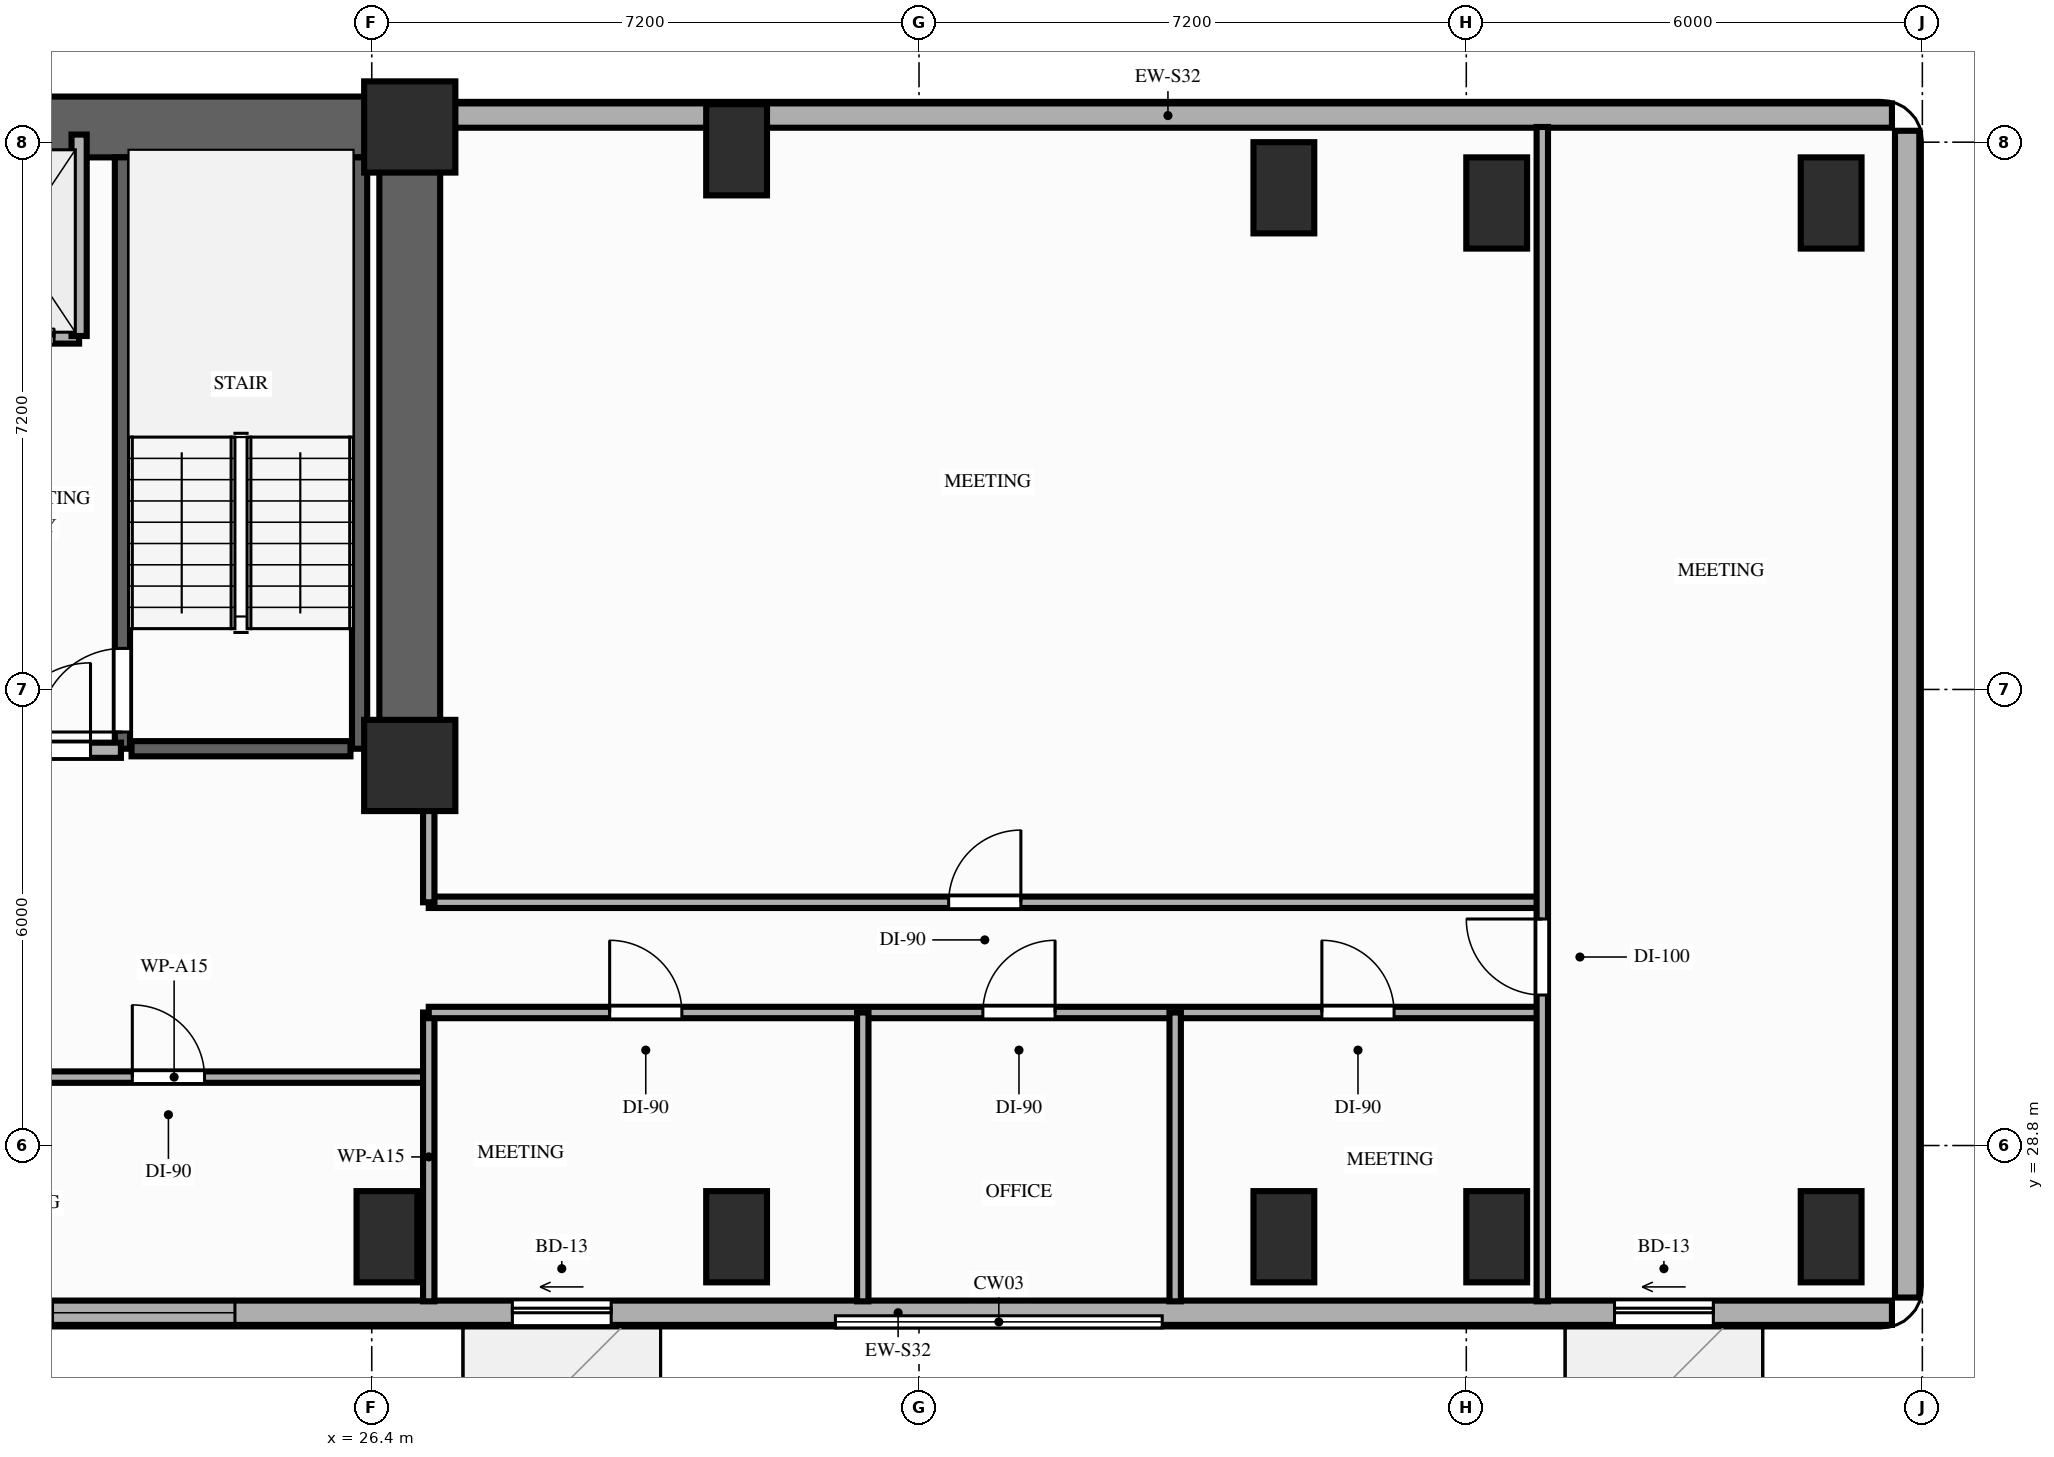
"""IFC4 building model, lengths in metres.
Left out: names, types, materials, properties, quantities, classifications, styles, units other than length and angle.
Written with IfcOpenShell. Run it as: python <this file> out.ifc"""

import sys

from ifc_helpers import new_model, si_unit, direction, frame, frame_2d, origin, origin_2d, place, context, subcontext, project, spatial, rectangle, extrude, element, fill, save


model = new_model("IFC4")
c1 = context("Model", 3, precision=1e-05, world=origin(), true_north=direction((0.0, 1.0)))
c2 = subcontext(c1, "Body", "Model", "MODEL_VIEW")
j1 = project(units=[si_unit("LENGTHUNIT", "METRE"), si_unit("PLANEANGLEUNIT", "RADIAN")], contexts=[c1])
p1 = place(None, origin())
s1 = spatial("IfcSite", under=j1, at=p1, CompositionType="ELEMENT")
p2 = place(p1, origin())
s2 = spatial("IfcBuilding", under=s1, at=p2, CompositionType="ELEMENT")
p3 = place(p2, frame((0.0, 0.0, 69.2)))
s3 = spatial("IfcBuildingStorey", under=s2, at=p3, CompositionType="ELEMENT", Elevation=69.2)
for number, where, z_axis, x_axis in (
    (1, (26.9, 33.8, 0.0), (0.0, 0.0, 1.0), (1.0, 0.0, 0.0)),
    (2, (26.9, 42.2, 0.0), (0.0, 0.0, 1.0), (1.0, 0.0, 0.0)),
):
    element("IfcColumn", number, at=place(p3, frame(where, z_axis=z_axis, x_axis=x_axis)), inside=s3, PredefinedType="COLUMN", context=c2, shape_type="SweptSolid", body=[
        extrude(rectangle(XDim=1.2, YDim=1.2, at=origin_2d()), origin(), (0.0, 0.0, 1.0), 3.2),
    ])
for number, where, z_axis, x_axis in (
    (3, (26.6, 27.6, 0.0), (0.0, 0.0, 1.0), (1.0, 0.0, 0.0)),
    (4, (31.2, 27.6, 0.0), (0.0, 0.0, 1.0), (1.0, 0.0, 0.0)),
    (5, (31.2, 41.9, 0.0), (0.0, 0.0, 1.0), (1.0, 0.0, 0.0)),
    (6, (38.4, 27.6, 0.0), (0.0, 0.0, 1.0), (1.0, 0.0, 0.0)),
    (7, (38.4, 41.4, 0.0), (0.0, 0.0, 1.0), (1.0, 0.0, 0.0)),
    (8, (41.2, 27.6, 0.0), (0.0, 0.0, 1.0), (1.0, 0.0, 0.0)),
    (9, (41.2, 41.2, 0.0), (0.0, 0.0, 1.0), (1.0, 0.0, 0.0)),
    (10, (45.6, 27.6, 0.0), (0.0, 0.0, 1.0), (1.0, 0.0, 0.0)),
    (11, (45.6, 41.2, 0.0), (0.0, 0.0, 1.0), (1.0, 0.0, 0.0)),
):
    element("IfcColumn", number, at=place(p3, frame(where, z_axis=z_axis, x_axis=x_axis)), inside=s3, PredefinedType="COLUMN", context=c2, shape_type="SweptSolid", body=[
        extrude(rectangle(XDim=0.8, YDim=1.2, at=origin_2d()), origin(), (0.0, 0.0, 1.0), 3.2),
    ])
p4 = place(p3, frame((46.4, 42.35, 0.0), z_axis=(0.0, 0.0, 1.0), x_axis=(-1.0, 0.0, 0.0)))
e12 = element("IfcWall", 12, at=p4, inside=s3, PredefinedType="STANDARD", context=c2, shape_type="SweptSolid", body=[
    extrude(rectangle(XDim=19.05, YDim=0.32, at=frame_2d((9.525, 0.0))), origin(), (0.0, 0.0, 1.0), 2.41),
])
p5 = place(p3, frame((20.25, 26.6, 0.0), z_axis=(0.0, 0.0, 1.0), x_axis=(1.0, 0.0, 0.0)))
e13 = element("IfcWall", 13, at=p5, inside=s3, PredefinedType="STANDARD", context=c2, shape_type="SweptSolid", body=[
    extrude(rectangle(XDim=26.15, YDim=0.32, at=frame_2d((13.075, 0.0))), origin(), (0.0, 0.0, 1.0), 3.02),
])
p6 = place(p5, frame((8.0, 0.0, 0.0)))
e14 = element("IfcOpeningElement", 14, at=p6, cuts=e13, PredefinedType="OPENING", context=c2, shape_type="SweptSolid", body=[
    extrude(rectangle(XDim=1.3, YDim=2.08, at=frame_2d((0.65, 1.04))), frame((0.0, 0.17, 0.0), z_axis=(0.0, -1.0, 0.0), x_axis=(1.0, 0.0, 0.0)), (0.0, 0.0, 1.0), 0.34),
])
p7 = place(p5, frame((22.5, 0.0, 0.0)))
e15 = element("IfcOpeningElement", 15, at=p7, cuts=e13, PredefinedType="OPENING", context=c2, shape_type="SweptSolid", body=[
    extrude(rectangle(XDim=1.3, YDim=2.08, at=frame_2d((0.65, 1.04))), frame((0.0, 0.17, 0.0), z_axis=(0.0, -1.0, 0.0), x_axis=(1.0, 0.0, 0.0)), (0.0, 0.0, 1.0), 0.34),
])
p8 = place(p5, frame((1.95, 0.0, 0.85)))
e16 = element("IfcOpeningElement", 16, at=p8, cuts=e13, PredefinedType="OPENING", context=c2, shape_type="SweptSolid", body=[
    extrude(rectangle(XDim=2.4, YDim=1.8, at=frame_2d((1.2, 0.9))), frame((0.0, 0.17, 0.0), z_axis=(0.0, -1.0, 0.0), x_axis=(1.0, 0.0, 0.0)), (0.0, 0.0, 1.0), 0.34),
])
p9 = place(p3, frame((46.6, 26.8, 0.0), z_axis=(0.0, 0.0, 1.0), x_axis=(0.0, 1.0, 0.0)))
e17 = element("IfcWall", 17, at=p9, inside=s3, PredefinedType="STANDARD", context=c2, shape_type="SweptSolid", body=[
    extrude(rectangle(XDim=15.35, YDim=0.32, at=frame_2d((7.675, 0.0))), origin(), (0.0, 0.0, 1.0), 3.02),
])
p10 = place(p3, frame((6.45, 42.2, 0.0), z_axis=(0.0, 0.0, 1.0), x_axis=(1.0, 0.0, 0.0)))
e18 = element("IfcWall", 18, at=p10, inside=s3, PredefinedType="SHEAR", context=c2, shape_type="SweptSolid", body=[
    extrude(rectangle(XDim=20.45, YDim=0.8, at=frame_2d((10.225, 0.0))), origin(), (0.0, 0.0, 1.0), 3.02),
])
p11 = place(p3, frame((26.9, 33.8, 0.0), z_axis=(0.0, 0.0, 1.0), x_axis=(0.0, 1.0, 0.0)))
e19 = element("IfcWall", 19, at=p11, inside=s3, PredefinedType="SHEAR", context=c2, shape_type="SweptSolid", body=[
    extrude(rectangle(XDim=7.95, YDim=0.8, at=frame_2d((3.975, 0.0))), origin(), (0.0, 0.0, 1.0), 3.02),
])
p12 = place(p3, frame((23.12, 34.02, 0.0), z_axis=(0.0, 0.0, 1.0), x_axis=(0.0, 1.0, 0.0)))
e20 = element("IfcWall", 20, at=p12, inside=s3, PredefinedType="SHEAR", context=c2, shape_type="SweptSolid", body=[
    extrude(rectangle(XDim=7.78, YDim=0.2, at=frame_2d((3.89, 0.0))), origin(), (0.0, 0.0, 1.0), 3.02),
])
p13 = place(p12, frame((0.22, 0.0, 0.0)))
e21 = element("IfcOpeningElement", 21, at=p13, cuts=e20, PredefinedType="OPENING", context=c2, shape_type="SweptSolid", body=[
    extrude(rectangle(XDim=1.1, YDim=2.15, at=frame_2d((0.55, 1.075))), frame((0.0, 0.11, 0.0), z_axis=(0.0, -1.0, 0.0), x_axis=(1.0, 0.0, 0.0)), (0.0, 0.0, 1.0), 0.22),
])
p14 = place(p3, frame((26.24, 34.02, 0.0), z_axis=(0.0, 0.0, 1.0), x_axis=(0.0, 1.0, 0.0)))
e22 = element("IfcWall", 22, at=p14, inside=s3, PredefinedType="SHEAR", context=c2, shape_type="SweptSolid", body=[
    extrude(rectangle(XDim=7.78, YDim=0.2, at=frame_2d((3.89, 0.0))), origin(), (0.0, 0.0, 1.0), 3.02),
])
p15 = place(p3, frame((23.24, 34.02, 0.0), z_axis=(0.0, 0.0, 1.0), x_axis=(1.0, 0.0, 0.0)))
e23 = element("IfcWall", 23, at=p15, inside=s3, PredefinedType="SHEAR", context=c2, shape_type="SweptSolid", body=[
    extrude(rectangle(XDim=2.88, YDim=0.2, at=frame_2d((1.44, 0.0))), origin(), (0.0, 0.0, 1.0), 3.02),
])
p16 = place(p3, frame((20.85, 39.45, 0.0), z_axis=(0.0, 0.0, 1.0), x_axis=(1.0, 0.0, 0.0)))
e24 = element("IfcWall", 24, at=p16, inside=s3, PredefinedType="MOVABLE", context=c2, shape_type="SweptSolid", body=[
    extrude(rectangle(XDim=1.7, YDim=0.2, at=frame_2d((0.85, 0.0))), origin(), (0.0, 0.0, 1.0), 3.02),
])
p17 = place(p16, frame((0.32, 0.0, 0.0)))
e25 = element("IfcOpeningElement", 25, at=p17, cuts=e24, PredefinedType="OPENING", context=c2, shape_type="SweptSolid", body=[
    extrude(rectangle(XDim=1.05, YDim=2.15, at=frame_2d((0.525, 1.075))), frame((0.0, 0.11, 0.0), z_axis=(0.0, -1.0, 0.0), x_axis=(1.0, 0.0, 0.0)), (0.0, 0.0, 1.0), 0.22),
])
p18 = place(p3, frame((22.55, 39.45, 0.0), z_axis=(0.0, 0.0, 1.0), x_axis=(0.0, 1.0, 0.0)))
e26 = element("IfcWall", 26, at=p18, inside=s3, PredefinedType="MOVABLE", context=c2, shape_type="SweptSolid", body=[
    extrude(rectangle(XDim=2.65, YDim=0.2, at=frame_2d((1.325, 0.0))), origin(), (0.0, 0.0, 1.0), 2.41),
])
p19 = place(p3, frame((20.5, 34.0, 0.0), z_axis=(0.0, 0.0, 1.0), x_axis=(1.0, 0.0, 0.0)))
e27 = element("IfcWall", 27, at=p19, inside=s3, PredefinedType="PARTITIONING", context=c2, shape_type="SweptSolid", body=[
    extrude(rectangle(XDim=2.6, YDim=0.2, at=frame_2d((1.3, 0.0))), origin(), (0.0, 0.0, 1.0), 2.41),
])
p20 = place(p19, frame((1.05, 0.0, 0.0)))
e28 = element("IfcOpeningElement", 28, at=p20, cuts=e27, PredefinedType="OPENING", context=c2, shape_type="SweptSolid", body=[
    extrude(rectangle(XDim=1.15, YDim=2.15, at=frame_2d((0.575, 1.075))), frame((0.0, 0.11, 0.0), z_axis=(0.0, -1.0, 0.0), x_axis=(1.0, 0.0, 0.0)), (0.0, 0.0, 1.0), 0.22),
])
p21 = place(p3, frame((20.45, 29.7, 0.0), z_axis=(0.0, 0.0, 1.0), x_axis=(1.0, 0.0, 0.0)))
e29 = element("IfcWall", 29, at=p21, inside=s3, PredefinedType="PARTITIONING", context=c2, shape_type="SweptSolid", body=[
    extrude(rectangle(XDim=6.7, YDim=0.15, at=frame_2d((3.35, 0.0))), origin(), (0.0, 0.0, 1.0), 3.02),
])
p22 = place(p21, frame((2.8, 0.0, 0.0)))
e30 = element("IfcOpeningElement", 30, at=p22, cuts=e29, PredefinedType="OPENING", context=c2, shape_type="SweptSolid", body=[
    extrude(rectangle(XDim=0.95, YDim=2.15, at=frame_2d((0.475, 1.075))), frame((0.0, 0.085, 0.0), z_axis=(0.0, -1.0, 0.0), x_axis=(1.0, 0.0, 0.0)), (0.0, 0.0, 1.0), 0.17),
])
p23 = place(p3, frame((27.15, 26.75, 0.0), z_axis=(0.0, 0.0, 1.0), x_axis=(0.0, 1.0, 0.0)))
e31 = element("IfcWall", 31, at=p23, inside=s3, PredefinedType="PARTITIONING", context=c2, shape_type="SweptSolid", body=[
    extrude(rectangle(XDim=3.8, YDim=0.15, at=frame_2d((1.9, 0.0))), origin(), (0.0, 0.0, 1.0), 2.41),
])
p24 = place(p3, frame((27.15, 30.55, 0.0), z_axis=(0.0, 0.0, 1.0), x_axis=(1.0, 0.0, 0.0)))
e32 = element("IfcWall", 32, at=p24, inside=s3, PredefinedType="PARTITIONING", context=c2, shape_type="SweptSolid", body=[
    extrude(rectangle(XDim=14.65, YDim=0.15, at=frame_2d((7.325, 0.0))), origin(), (0.0, 0.0, 1.0), 2.41),
])
p25 = place(p24, frame((2.38, 0.0, 0.0)))
e33 = element("IfcOpeningElement", 33, at=p25, cuts=e32, PredefinedType="OPENING", context=c2, shape_type="SweptSolid", body=[
    extrude(rectangle(XDim=0.95, YDim=2.15, at=frame_2d((0.475, 1.075))), frame((0.0, 0.085, 0.0), z_axis=(0.0, -1.0, 0.0), x_axis=(1.0, 0.0, 0.0)), (0.0, 0.0, 1.0), 0.17),
])
p26 = place(p24, frame((7.29, 0.0, 0.0)))
e34 = element("IfcOpeningElement", 34, at=p26, cuts=e32, PredefinedType="OPENING", context=c2, shape_type="SweptSolid", body=[
    extrude(rectangle(XDim=0.95, YDim=2.15, at=frame_2d((0.475, 1.075))), frame((0.0, 0.085, 0.0), z_axis=(0.0, -1.0, 0.0), x_axis=(1.0, 0.0, 0.0)), (0.0, 0.0, 1.0), 0.17),
])
p27 = place(p24, frame((11.75, 0.0, 0.0)))
e35 = element("IfcOpeningElement", 35, at=p27, cuts=e32, PredefinedType="OPENING", context=c2, shape_type="SweptSolid", body=[
    extrude(rectangle(XDim=0.95, YDim=2.15, at=frame_2d((0.475, 1.075))), frame((0.0, 0.085, 0.0), z_axis=(0.0, -1.0, 0.0), x_axis=(1.0, 0.0, 0.0)), (0.0, 0.0, 1.0), 0.17),
])
p28 = place(p3, frame((27.15, 32.0, 0.0), z_axis=(0.0, 0.0, 1.0), x_axis=(1.0, 0.0, 0.0)))
e36 = element("IfcWall", 36, at=p28, inside=s3, PredefinedType="PARTITIONING", context=c2, shape_type="SweptSolid", body=[
    extrude(rectangle(XDim=14.65, YDim=0.15, at=frame_2d((7.325, 0.0))), origin(), (0.0, 0.0, 1.0), 2.41),
])
p29 = place(p28, frame((6.84, 0.0, 0.0)))
e37 = element("IfcOpeningElement", 37, at=p29, cuts=e36, PredefinedType="OPENING", context=c2, shape_type="SweptSolid", body=[
    extrude(rectangle(XDim=0.95, YDim=2.15, at=frame_2d((0.475, 1.075))), frame((0.0, 0.085, 0.0), z_axis=(0.0, -1.0, 0.0), x_axis=(1.0, 0.0, 0.0)), (0.0, 0.0, 1.0), 0.17),
])
p30 = place(p3, frame((27.15, 32.0, 0.0), z_axis=(0.0, 0.0, 1.0), x_axis=(0.0, 1.0, 0.0)))
e38 = element("IfcWall", 38, at=p30, inside=s3, PredefinedType="PARTITIONING", context=c2, shape_type="SweptSolid", body=[
    extrude(rectangle(XDim=1.68, YDim=0.15, at=frame_2d((0.84, 0.0))), origin(), (0.0, 0.0, 1.0), 2.41),
])
p31 = place(p3, frame((41.8, 26.75, 0.0), z_axis=(0.0, 0.0, 1.0), x_axis=(0.0, 1.0, 0.0)))
e39 = element("IfcWall", 39, at=p31, inside=s3, PredefinedType="PARTITIONING", context=c2, shape_type="SweptSolid", body=[
    extrude(rectangle(XDim=15.45, YDim=0.15, at=frame_2d((7.725, 0.0))), origin(), (0.0, 0.0, 1.0), 2.41),
])
p32 = place(p31, frame((4.03, 0.0, 0.0)))
e40 = element("IfcOpeningElement", 40, at=p32, cuts=e39, PredefinedType="OPENING", context=c2, shape_type="SweptSolid", body=[
    extrude(rectangle(XDim=1.0, YDim=2.15, at=frame_2d((0.5, 1.075))), frame((0.0, 0.085, 0.0), z_axis=(0.0, -1.0, 0.0), x_axis=(1.0, 0.0, 0.0)), (0.0, 0.0, 1.0), 0.17),
])
for number, where, z_axis, x_axis in (
    (41, (32.86, 26.75, 0.0), (0.0, 0.0, 1.0), (0.0, 1.0, 0.0)),
    (42, (36.97, 26.75, 0.0), (0.0, 0.0, 1.0), (0.0, 1.0, 0.0)),
):
    element("IfcWall", number, at=place(p3, frame(where, z_axis=z_axis, x_axis=x_axis)), inside=s3, PredefinedType="PARTITIONING", context=c2, shape_type="SweptSolid", body=[
        extrude(rectangle(XDim=3.8, YDim=0.15, at=frame_2d((1.9, 0.0))), origin(), (0.0, 0.0, 1.0), 2.41),
    ])
p33 = place(p6, origin())
e43 = element("IfcDoor", 43, at=p33, inside=s3, OperationType="SLIDING_TO_LEFT", PredefinedType="DOOR", context=c2, shape_type="SweptSolid", body=[
    extrude(rectangle(XDim=1.3, YDim=2.08, at=frame_2d((0.65, 1.04))), frame((0.0, 0.025, 0.0), z_axis=(0.0, -1.0, 0.0), x_axis=(1.0, 0.0, 0.0)), (0.0, 0.0, 1.0), 0.05),
])
fill(e14, e43)
p34 = place(p7, origin())
e44 = element("IfcDoor", 44, at=p34, inside=s3, OperationType="SLIDING_TO_LEFT", PredefinedType="DOOR", context=c2, shape_type="SweptSolid", body=[
    extrude(rectangle(XDim=1.3, YDim=2.08, at=frame_2d((0.65, 1.04))), frame((0.0, 0.025, 0.0), z_axis=(0.0, -1.0, 0.0), x_axis=(1.0, 0.0, 0.0)), (0.0, 0.0, 1.0), 0.05),
])
fill(e15, e44)
p35 = place(p8, origin())
e45 = element("IfcWindow", 45, at=p35, inside=s3, PartitioningType="SINGLE_PANEL", PredefinedType="WINDOW", context=c2, shape_type="SweptSolid", body=[
    extrude(rectangle(XDim=2.4, YDim=1.8, at=frame_2d((1.2, 0.9))), frame((0.0, 0.03, 0.0), z_axis=(0.0, -1.0, 0.0), x_axis=(1.0, 0.0, 0.0)), (0.0, 0.0, 1.0), 0.06),
])
fill(e16, e45)
p36 = place(p13, origin())
e46 = element("IfcDoor", 46, at=p36, inside=s3, OperationType="SINGLE_SWING_LEFT", PredefinedType="DOOR", context=c2, shape_type="SweptSolid", body=[
    extrude(rectangle(XDim=1.1, YDim=2.15, at=frame_2d((0.55, 1.075))), frame((0.0, 0.025, 0.0), z_axis=(0.0, -1.0, 0.0), x_axis=(1.0, 0.0, 0.0)), (0.0, 0.0, 1.0), 0.05),
])
fill(e21, e46)
p37 = place(p17, origin())
e47 = element("IfcDoor", 47, at=p37, inside=s3, OperationType="SLIDING_TO_LEFT", PredefinedType="DOOR", context=c2, shape_type="SweptSolid", body=[
    extrude(rectangle(XDim=1.05, YDim=2.15, at=frame_2d((0.525, 1.075))), frame((0.0, 0.025, 0.0), z_axis=(0.0, -1.0, 0.0), x_axis=(1.0, 0.0, 0.0)), (0.0, 0.0, 1.0), 0.05),
])
fill(e25, e47)
p38 = place(p20, origin())
e48 = element("IfcDoor", 48, at=p38, inside=s3, OperationType="SINGLE_SWING_RIGHT", PredefinedType="DOOR", context=c2, shape_type="SweptSolid", body=[
    extrude(rectangle(XDim=1.15, YDim=2.15, at=frame_2d((0.575, 1.075))), frame((0.0, 0.025, 0.0), z_axis=(0.0, -1.0, 0.0), x_axis=(1.0, 0.0, 0.0)), (0.0, 0.0, 1.0), 0.05),
])
fill(e28, e48)
p39 = place(p22, origin())
e49 = element("IfcDoor", 49, at=p39, inside=s3, OperationType="SINGLE_SWING_LEFT", PredefinedType="DOOR", context=c2, shape_type="SweptSolid", body=[
    extrude(rectangle(XDim=0.95, YDim=2.15, at=frame_2d((0.475, 1.075))), frame((0.0, 0.025, 0.0), z_axis=(0.0, -1.0, 0.0), x_axis=(1.0, 0.0, 0.0)), (0.0, 0.0, 1.0), 0.05),
])
fill(e30, e49)
p40 = place(p32, origin())
e50 = element("IfcDoor", 50, at=p40, inside=s3, OperationType="SINGLE_SWING_RIGHT", PredefinedType="DOOR", context=c2, shape_type="SweptSolid", body=[
    extrude(rectangle(XDim=1.0, YDim=2.15, at=frame_2d((0.5, 1.075))), frame((0.0, 0.025, 0.0), z_axis=(0.0, -1.0, 0.0), x_axis=(1.0, 0.0, 0.0)), (0.0, 0.0, 1.0), 0.05),
])
fill(e40, e50)
p41 = place(p25, origin())
e51 = element("IfcDoor", 51, at=p41, inside=s3, OperationType="SINGLE_SWING_LEFT", PredefinedType="DOOR", context=c2, shape_type="SweptSolid", body=[
    extrude(rectangle(XDim=0.95, YDim=2.15, at=frame_2d((0.475, 1.075))), frame((0.0, 0.025, 0.0), z_axis=(0.0, -1.0, 0.0), x_axis=(1.0, 0.0, 0.0)), (0.0, 0.0, 1.0), 0.05),
])
fill(e33, e51)
p42 = place(p26, origin())
e52 = element("IfcDoor", 52, at=p42, inside=s3, OperationType="SINGLE_SWING_RIGHT", PredefinedType="DOOR", context=c2, shape_type="SweptSolid", body=[
    extrude(rectangle(XDim=0.95, YDim=2.15, at=frame_2d((0.475, 1.075))), frame((0.0, 0.025, 0.0), z_axis=(0.0, -1.0, 0.0), x_axis=(1.0, 0.0, 0.0)), (0.0, 0.0, 1.0), 0.05),
])
fill(e34, e52)
p43 = place(p27, origin())
e53 = element("IfcDoor", 53, at=p43, inside=s3, OperationType="SINGLE_SWING_LEFT", PredefinedType="DOOR", context=c2, shape_type="SweptSolid", body=[
    extrude(rectangle(XDim=0.95, YDim=2.15, at=frame_2d((0.475, 1.075))), frame((0.0, 0.025, 0.0), z_axis=(0.0, -1.0, 0.0), x_axis=(1.0, 0.0, 0.0)), (0.0, 0.0, 1.0), 0.05),
])
fill(e35, e53)
p44 = place(p29, origin())
e54 = element("IfcDoor", 54, at=p44, inside=s3, OperationType="SINGLE_SWING_RIGHT", PredefinedType="DOOR", context=c2, shape_type="SweptSolid", body=[
    extrude(rectangle(XDim=0.95, YDim=2.15, at=frame_2d((0.475, 1.075))), frame((0.0, 0.025, 0.0), z_axis=(0.0, -1.0, 0.0), x_axis=(1.0, 0.0, 0.0)), (0.0, 0.0, 1.0), 0.05),
])
fill(e37, e54)
save(model, sys.argv[1])
